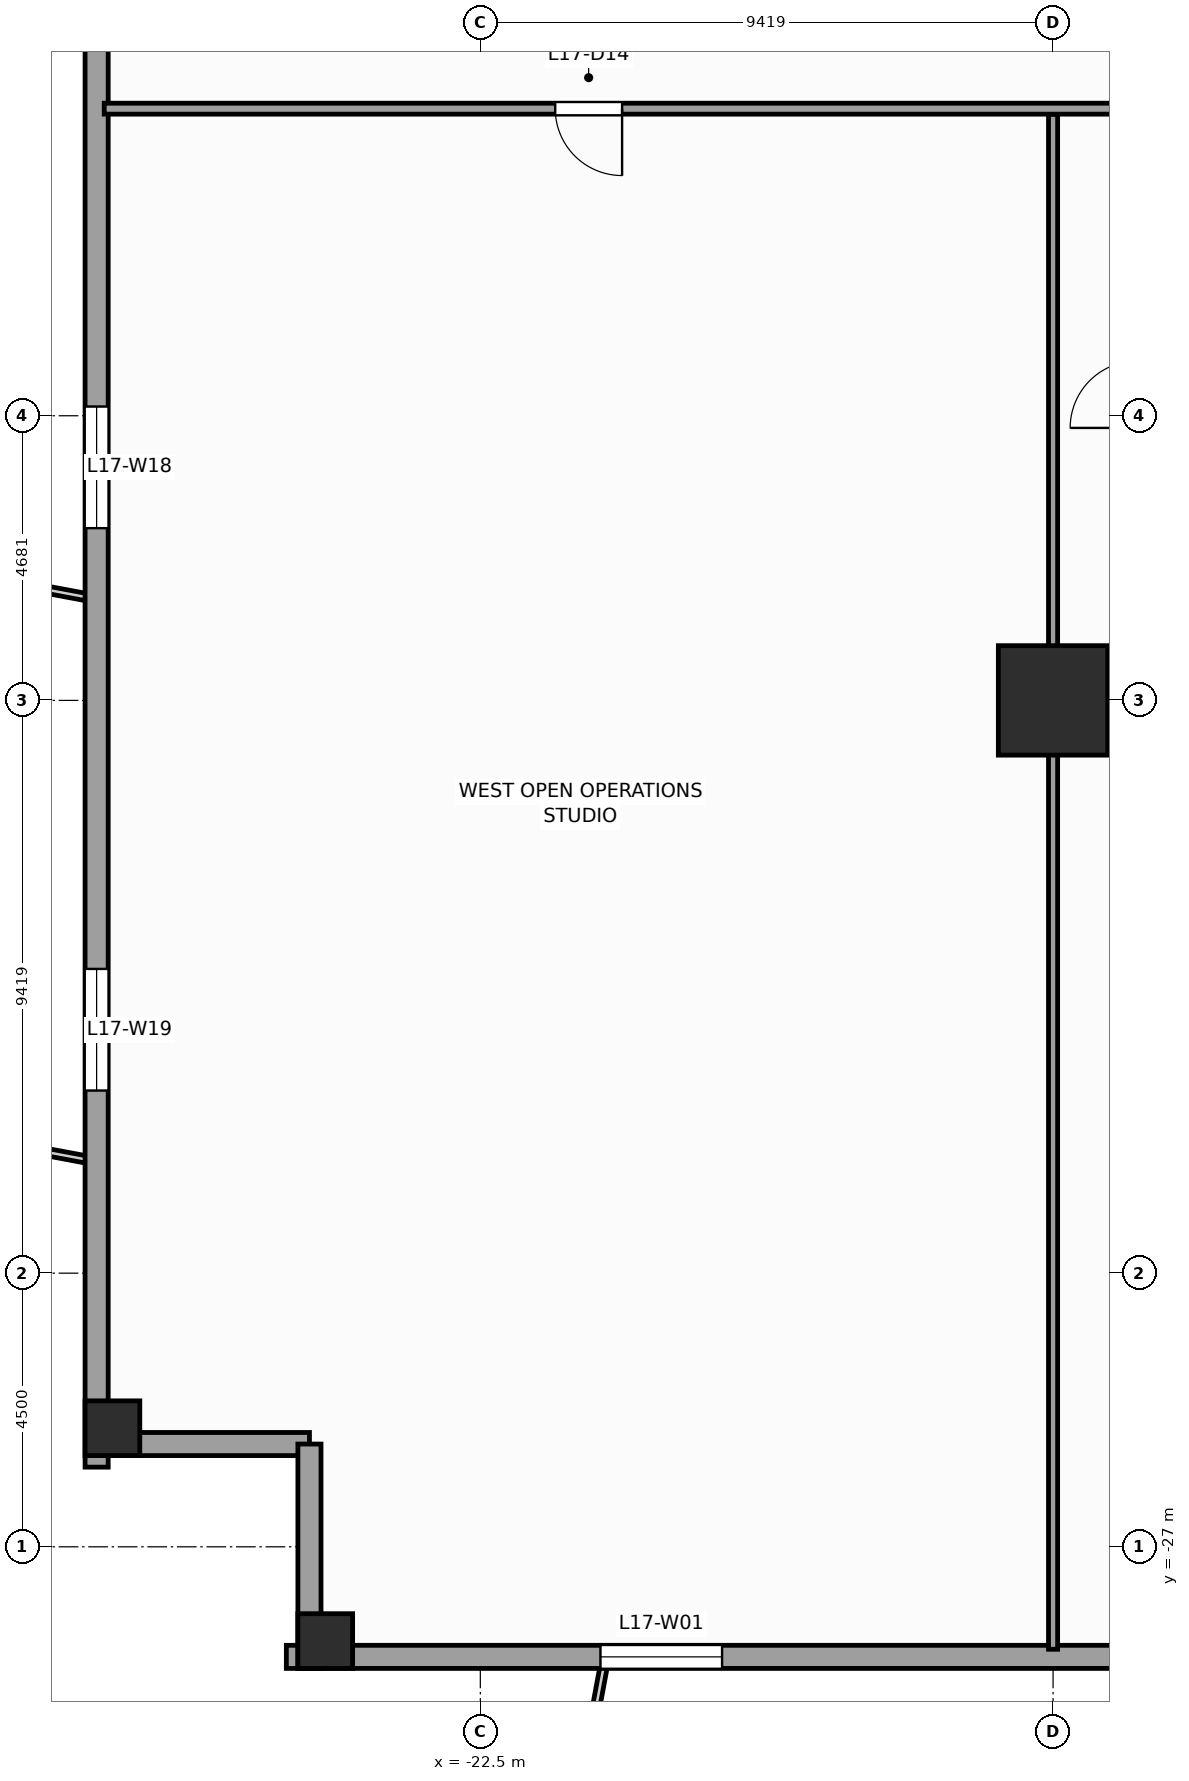
"""IFC4 building model, lengths in metres.
Left out: names, types, materials, properties, quantities, classifications, styles, units other than length and angle.
Written with IfcOpenShell. Run it as: python <this file> out.ifc"""

import sys

from ifc_helpers import new_model, si_unit, direction, frame, frame_2d, origin, origin_2d, place, context, subcontext, project, spatial, rectangle, extrude, source, transform, mapped, element, fill, save


model = new_model("IFC4")
c1 = context("Model", 3, precision=1e-05, world=origin(), true_north=direction((0.0, 1.0)))
c2 = subcontext(c1, "Body", "Model", "MODEL_VIEW")
j1 = project(units=[si_unit("LENGTHUNIT", "METRE"), si_unit("PLANEANGLEUNIT", "RADIAN")], contexts=[c1])
p1 = place(None, origin())
s1 = spatial("IfcSite", under=j1, at=p1, CompositionType="ELEMENT")
p2 = place(p1, origin())
s2 = spatial("IfcBuilding", under=s1, at=p2, CompositionType="ELEMENT")
p3 = place(p2, frame((0.0, 0.0, 74.0)))
s3 = spatial("IfcBuildingStorey", under=s2, at=p3, CompositionType="ELEMENT", Elevation=74.0)
m1 = source(origin(), c2, "Body", "SweptSolid", [
    extrude(rectangle(XDim=1.8, YDim=1.8, at=origin_2d()), origin(), (0.0, 0.0, 1.0), 4.0),
])
p4 = place(p3, frame((-13.081, -13.081, 0.0), z_axis=(0.0, 0.0, 1.0), x_axis=(1.0, 0.0, 0.0)))
e1 = element("IfcColumn", 1, at=p4, inside=s3, PredefinedType="COLUMN", context=c2, shape_type="MappedRepresentation", body=[
    mapped(m1, transform((0.0, 0.0, 0.0), scale=1.0)),
])
m2 = source(origin(), c2, "Body", "SweptSolid", [
    extrude(rectangle(XDim=0.9, YDim=0.9, at=origin_2d()), origin(), (0.0, 0.0, 1.0), 4.0),
])
for number, where, z_axis, x_axis in (
    (2, (-25.05, -28.55, 0.0), (0.0, 0.0, 1.0), (1.0, 0.0, 0.0)),
    (3, (-28.55, -25.05, 0.0), (0.0, 0.0, 1.0), (1.0, 0.0, 0.0)),
):
    element("IfcColumn", number, at=place(p3, frame(where, z_axis=z_axis, x_axis=x_axis)), inside=s3, PredefinedType="COLUMN", context=c2, shape_type="MappedRepresentation", body=[
        mapped(m2, transform((0.0, 0.0, 0.0), scale=1.0)),
    ])
p5 = place(p3, frame((-25.69, -28.81, 0.0), z_axis=(0.0, 0.0, 1.0), x_axis=(1.0, 0.0, 0.0)))
e4 = element("IfcWall", 4, at=p5, inside=s3, PredefinedType="STANDARD", context=c2, shape_type="SweptSolid", body=[
    extrude(rectangle(XDim=51.38, YDim=0.38, at=frame_2d((25.69, 0.0))), origin(), (0.0, 0.0, 1.0), 2.2),
])
p6 = place(p5, frame((31.615, 0.0, 0.0)))
e5 = element("IfcOpeningElement", 5, at=p6, cuts=e4, PredefinedType="OPENING", context=c2, shape_type="SweptSolid", body=[
    extrude(rectangle(XDim=1.05, YDim=2.02, at=frame_2d((0.525, 1.01))), frame((0.0, 0.2, 0.0), z_axis=(0.0, -1.0, 0.0), x_axis=(1.0, 0.0, 0.0)), (0.0, 0.0, 1.0), 0.4),
])
p7 = place(p5, frame((5.166, 0.0, 0.67)))
e6 = element("IfcOpeningElement", 6, at=p7, cuts=e4, PredefinedType="OPENING", context=c2, shape_type="SweptSolid", body=[
    extrude(rectangle(XDim=2.0, YDim=1.45, at=frame_2d((1.0, 0.725))), frame((0.0, 0.2, 0.0), z_axis=(0.0, -1.0, 0.0), x_axis=(1.0, 0.0, 0.0)), (0.0, 0.0, 1.0), 0.4),
])
p8 = place(p5, frame((13.9, 0.0, 0.67)))
e7 = element("IfcOpeningElement", 7, at=p8, cuts=e4, PredefinedType="OPENING", context=c2, shape_type="SweptSolid", body=[
    extrude(rectangle(XDim=2.0, YDim=1.45, at=frame_2d((1.0, 0.725))), frame((0.0, 0.2, 0.0), z_axis=(0.0, -1.0, 0.0), x_axis=(1.0, 0.0, 0.0)), (0.0, 0.0, 1.0), 0.4),
])
p9 = place(p5, frame((22.912, 0.0, 0.67)))
e8 = element("IfcOpeningElement", 8, at=p9, cuts=e4, PredefinedType="OPENING", context=c2, shape_type="SweptSolid", body=[
    extrude(rectangle(XDim=2.0, YDim=1.45, at=frame_2d((1.0, 0.725))), frame((0.0, 0.2, 0.0), z_axis=(0.0, -1.0, 0.0), x_axis=(1.0, 0.0, 0.0)), (0.0, 0.0, 1.0), 0.4),
])
p10 = place(p5, frame((35.438, 0.0, 0.67)))
e9 = element("IfcOpeningElement", 9, at=p10, cuts=e4, PredefinedType="OPENING", context=c2, shape_type="SweptSolid", body=[
    extrude(rectangle(XDim=2.0, YDim=1.45, at=frame_2d((1.0, 0.725))), frame((0.0, 0.2, 0.0), z_axis=(0.0, -1.0, 0.0), x_axis=(1.0, 0.0, 0.0)), (0.0, 0.0, 1.0), 0.4),
])
p11 = place(p5, frame((43.187, 0.0, 0.67)))
e10 = element("IfcOpeningElement", 10, at=p11, cuts=e4, PredefinedType="OPENING", context=c2, shape_type="SweptSolid", body=[
    extrude(rectangle(XDim=2.0, YDim=1.45, at=frame_2d((1.0, 0.725))), frame((0.0, 0.2, 0.0), z_axis=(0.0, -1.0, 0.0), x_axis=(1.0, 0.0, 0.0)), (0.0, 0.0, 1.0), 0.4),
])
p12 = place(p3, frame((-28.81, 25.69, 0.0), z_axis=(0.0, 0.0, 1.0), x_axis=(0.0, -1.0, 0.0)))
e11 = element("IfcWall", 11, at=p12, inside=s3, PredefinedType="STANDARD", context=c2, shape_type="SweptSolid", body=[
    extrude(rectangle(XDim=51.38, YDim=0.38, at=frame_2d((25.69, 0.0))), origin(), (0.0, 0.0, 1.0), 2.2),
])
p13 = place(p12, frame((5.166, 0.0, 0.67)))
e12 = element("IfcOpeningElement", 12, at=p13, cuts=e11, PredefinedType="OPENING", context=c2, shape_type="SweptSolid", body=[
    extrude(rectangle(XDim=2.0, YDim=1.45, at=frame_2d((1.0, 0.725))), frame((0.0, 0.2, 0.0), z_axis=(0.0, -1.0, 0.0), x_axis=(1.0, 0.0, 0.0)), (0.0, 0.0, 1.0), 0.4),
])
p14 = place(p12, frame((13.9, 0.0, 0.67)))
e13 = element("IfcOpeningElement", 13, at=p14, cuts=e11, PredefinedType="OPENING", context=c2, shape_type="SweptSolid", body=[
    extrude(rectangle(XDim=2.0, YDim=1.45, at=frame_2d((1.0, 0.725))), frame((0.0, 0.2, 0.0), z_axis=(0.0, -1.0, 0.0), x_axis=(1.0, 0.0, 0.0)), (0.0, 0.0, 1.0), 0.4),
])
p15 = place(p12, frame((22.912, 0.0, 0.67)))
e14 = element("IfcOpeningElement", 14, at=p15, cuts=e11, PredefinedType="OPENING", context=c2, shape_type="SweptSolid", body=[
    extrude(rectangle(XDim=2.0, YDim=1.45, at=frame_2d((1.0, 0.725))), frame((0.0, 0.2, 0.0), z_axis=(0.0, -1.0, 0.0), x_axis=(1.0, 0.0, 0.0)), (0.0, 0.0, 1.0), 0.4),
])
p16 = place(p12, frame((33.938, 0.0, 0.67)))
e15 = element("IfcOpeningElement", 15, at=p16, cuts=e11, PredefinedType="OPENING", context=c2, shape_type="SweptSolid", body=[
    extrude(rectangle(XDim=2.0, YDim=1.45, at=frame_2d((1.0, 0.725))), frame((0.0, 0.2, 0.0), z_axis=(0.0, -1.0, 0.0), x_axis=(1.0, 0.0, 0.0)), (0.0, 0.0, 1.0), 0.4),
])
p17 = place(p12, frame((43.187, 0.0, 0.67)))
e16 = element("IfcOpeningElement", 16, at=p17, cuts=e11, PredefinedType="OPENING", context=c2, shape_type="SweptSolid", body=[
    extrude(rectangle(XDim=2.0, YDim=1.45, at=frame_2d((1.0, 0.725))), frame((0.0, 0.2, 0.0), z_axis=(0.0, -1.0, 0.0), x_axis=(1.0, 0.0, 0.0)), (0.0, 0.0, 1.0), 0.4),
])
p18 = place(p3, frame((-28.81, -25.31, 0.0), z_axis=(0.0, 0.0, 1.0), x_axis=(1.0, 0.0, 0.0)))
e17 = element("IfcWall", 17, at=p18, inside=s3, PredefinedType="STANDARD", context=c2, shape_type="SweptSolid", body=[
    extrude(rectangle(XDim=3.5, YDim=0.38, at=frame_2d((1.75, 0.0))), origin(), (0.0, 0.0, 1.0), 3.6),
])
p19 = place(p3, frame((-25.31, -25.31, 0.0), z_axis=(0.0, 0.0, 1.0), x_axis=(0.0, -1.0, 0.0)))
e18 = element("IfcWall", 18, at=p19, inside=s3, PredefinedType="STANDARD", context=c2, shape_type="SweptSolid", body=[
    extrude(rectangle(XDim=3.69, YDim=0.38, at=frame_2d((1.845, 0.0))), origin(), (0.0, 0.0, 1.0), 3.6),
])
p20 = place(p3, frame((-28.685, -3.35, 0.0), z_axis=(0.0, 0.0, 1.0), x_axis=(1.0, 0.0, 0.0)))
e19 = element("IfcWall", 19, at=p20, inside=s3, PredefinedType="PARTITIONING", context=c2, shape_type="SweptSolid", body=[
    extrude(rectangle(XDim=16.885, YDim=0.18, at=frame_2d((8.442, 0.0))), origin(), (0.0, 0.0, 1.0), 3.6),
])
p21 = place(p20, frame((7.417, 0.0, 0.0)))
e20 = element("IfcOpeningElement", 20, at=p21, cuts=e19, PredefinedType="OPENING", context=c2, shape_type="SweptSolid", body=[
    extrude(rectangle(XDim=1.1, YDim=2.2, at=frame_2d((0.55, 1.1))), frame((0.0, 0.1, 0.0), z_axis=(0.0, -1.0, 0.0), x_axis=(1.0, 0.0, 0.0)), (0.0, 0.0, 1.0), 0.2),
])
p22 = place(p3, frame((-13.081, -28.685, 0.0), z_axis=(0.0, 0.0, 1.0), x_axis=(0.0, 1.0, 0.0)))
e21 = element("IfcWall", 21, at=p22, inside=s3, PredefinedType="PARTITIONING", context=c2, shape_type="SweptSolid", body=[
    extrude(rectangle(XDim=25.24, YDim=0.15, at=frame_2d((12.62, 0.0))), origin(), (0.0, 0.0, 1.0), 2.2),
])
m3 = source(origin(), c2, "Body", "SweptSolid", [
    extrude(rectangle(XDim=2.0, YDim=1.45, at=frame_2d((1.0, 0.725))), frame((0.0, 0.03, 0.0), z_axis=(0.0, -1.0, 0.0), x_axis=(1.0, 0.0, 0.0)), (0.0, 0.0, 1.0), 0.06),
])
p23 = place(p7, origin())
e22 = element("IfcWindow", 22, at=p23, inside=s3, PartitioningType="SINGLE_PANEL", PredefinedType="WINDOW", context=c2, shape_type="MappedRepresentation", body=[
    mapped(m3, transform((0.0, 0.0, 0.0), scale=1.0)),
])
fill(e6, e22)
p24 = place(p16, origin())
e23 = element("IfcWindow", 23, at=p24, inside=s3, PartitioningType="SINGLE_PANEL", PredefinedType="WINDOW", context=c2, shape_type="MappedRepresentation", body=[
    mapped(m3, transform((0.0, 0.0, 0.0), scale=1.0)),
])
fill(e15, e23)
p25 = place(p17, origin())
e24 = element("IfcWindow", 24, at=p25, inside=s3, PartitioningType="SINGLE_PANEL", PredefinedType="WINDOW", context=c2, shape_type="MappedRepresentation", body=[
    mapped(m3, transform((0.0, 0.0, 0.0), scale=1.0)),
])
fill(e16, e24)
m4 = source(origin(), c2, "Body", "SweptSolid", [
    extrude(rectangle(XDim=1.1, YDim=2.2, at=frame_2d((0.55, 1.1))), frame((0.0, 0.025, 0.0), z_axis=(0.0, -1.0, 0.0), x_axis=(1.0, 0.0, 0.0)), (0.0, 0.0, 1.0), 0.05),
])
p26 = place(p21, frame((1.1, 0.0, 0.0), z_axis=(0.0, 0.0, 1.0), x_axis=(-1.0, 0.0, 0.0)))
e25 = element("IfcDoor", 25, at=p26, inside=s3, OperationType="SINGLE_SWING_RIGHT", PredefinedType="DOOR", context=c2, shape_type="MappedRepresentation", body=[
    mapped(m4, transform((0.0, 0.0, 0.0), scale=1.0)),
])
fill(e20, e25)
save(model, sys.argv[1])
